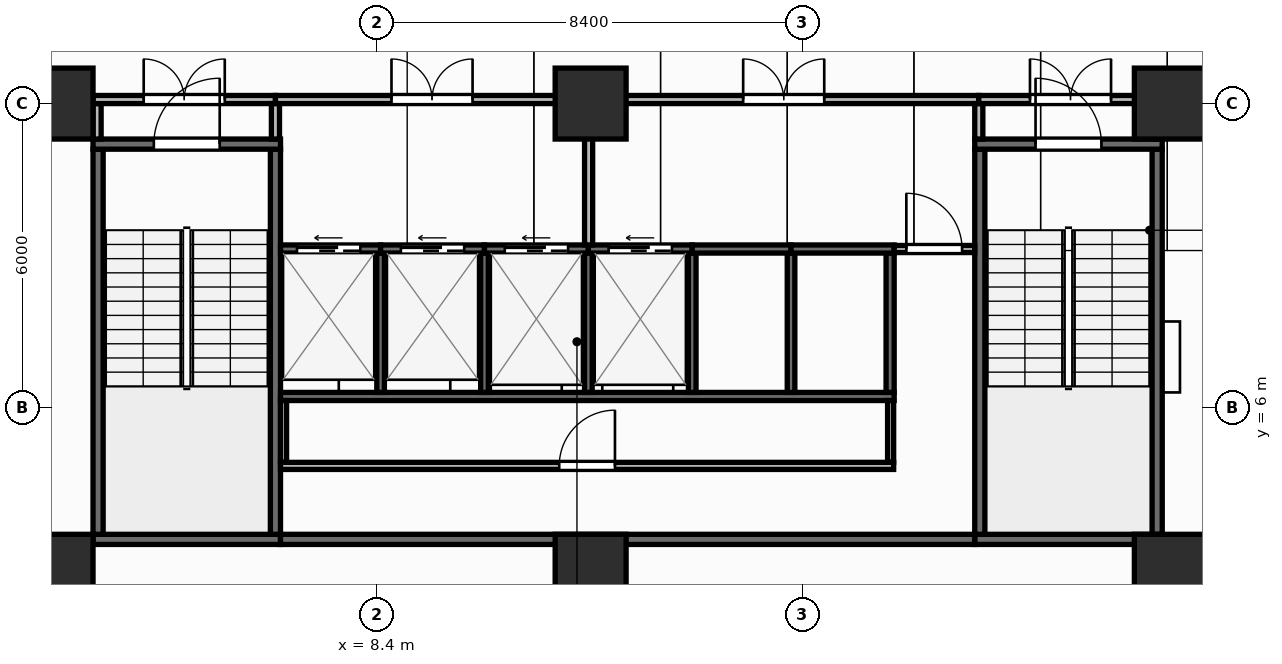
"""IFC4 building model, lengths in metres.
Left out: names, types, materials, properties, quantities, classifications, styles, units other than length and angle.
Written with IfcOpenShell. Run it as: python <this file> out.ifc"""

import sys

from ifc_helpers import new_model, si_unit, direction, frame, frame_2d, origin, origin_2d, place, context, subcontext, project, spatial, rectangle, extrude, element, fill, save


model = new_model("IFC4")
c1 = context("Model", 3, precision=1e-05, world=origin(), true_north=direction((0.0, 1.0)))
c2 = subcontext(c1, "Body", "Model", "MODEL_VIEW")
j1 = project(units=[si_unit("LENGTHUNIT", "METRE"), si_unit("PLANEANGLEUNIT", "RADIAN")], contexts=[c1])
p1 = place(None, origin())
s1 = spatial("IfcSite", under=j1, at=p1, CompositionType="ELEMENT")
p2 = place(p1, origin())
s2 = spatial("IfcBuilding", under=s1, at=p2, CompositionType="ELEMENT")
p3 = place(p2, frame((0.0, 0.0, -9.0)))
s3 = spatial("IfcBuildingStorey", under=s2, at=p3, CompositionType="ELEMENT", Elevation=-9.0)
for number, where, z_axis, x_axis in (
    (1, (2.1, 2.8, 0.0), (0.0, 0.0, 1.0), (1.0, 0.0, 0.0)),
    (2, (12.62, 2.8, 0.0), (0.0, 0.0, 1.0), (1.0, 0.0, 0.0)),
    (3, (24.05, 2.8, 0.0), (0.0, 0.0, 1.0), (1.0, 0.0, 0.0)),
    (4, (2.1, 12.0, 0.0), (0.0, 0.0, 1.0), (1.0, 0.0, 0.0)),
    (5, (12.62, 12.0, 0.0), (0.0, 0.0, 1.0), (1.0, 0.0, 0.0)),
    (6, (24.05, 12.0, 0.0), (0.0, 0.0, 1.0), (1.0, 0.0, 0.0)),
):
    element("IfcColumn", number, at=place(p3, frame(where, z_axis=z_axis, x_axis=x_axis)), inside=s3, PredefinedType="COLUMN", context=c2, shape_type="SweptSolid", body=[
        extrude(rectangle(XDim=1.4, YDim=1.4, at=origin_2d()), origin(), (0.0, 0.0, 1.0), 4.5),
    ])
p4 = place(p3, frame((2.8, 3.4, 0.0), z_axis=(0.0, 0.0, 1.0), x_axis=(1.0, 0.0, 0.0)))
e7 = element("IfcWall", 7, at=p4, inside=s3, PredefinedType="SHEAR", context=c2, shape_type="SweptSolid", body=[
    extrude(rectangle(XDim=3.7, YDim=0.2, at=frame_2d((1.85, 0.0))), origin(), (0.0, 0.0, 1.0), 4.24),
])
for number, where, z_axis, x_axis in (
    (8, (2.9, 3.5, 0.0), (0.0, 0.0, 1.0), (0.0, 1.0, 0.0)),
    (9, (6.4, 3.5, 0.0), (0.0, 0.0, 1.0), (0.0, 1.0, 0.0)),
):
    element("IfcWall", number, at=place(p3, frame(where, z_axis=z_axis, x_axis=x_axis)), inside=s3, PredefinedType="SHEAR", context=c2, shape_type="SweptSolid", body=[
        extrude(rectangle(XDim=7.6, YDim=0.2, at=frame_2d((3.8, 0.0))), origin(), (0.0, 0.0, 1.0), 4.24),
    ])
p5 = place(p3, frame((2.8, 11.2, 0.0), z_axis=(0.0, 0.0, 1.0), x_axis=(1.0, 0.0, 0.0)))
e10 = element("IfcWall", 10, at=p5, inside=s3, PredefinedType="SHEAR", context=c2, shape_type="SweptSolid", body=[
    extrude(rectangle(XDim=3.7, YDim=0.2, at=frame_2d((1.85, 0.0))), origin(), (0.0, 0.0, 1.0), 4.24),
])
p6 = place(p5, frame((1.2, 0.0, 0.0)))
e11 = element("IfcOpeningElement", 11, at=p6, cuts=e10, PredefinedType="OPENING", context=c2, shape_type="SweptSolid", body=[
    extrude(rectangle(XDim=1.3, YDim=2.15, at=frame_2d((0.65, 1.075))), frame((0.0, 0.11, 0.0), z_axis=(0.0, -1.0, 0.0), x_axis=(1.0, 0.0, 0.0)), (0.0, 0.0, 1.0), 0.22),
])
p7 = place(p3, frame((20.2, 3.4, 0.0), z_axis=(0.0, 0.0, 1.0), x_axis=(1.0, 0.0, 0.0)))
e12 = element("IfcWall", 12, at=p7, inside=s3, PredefinedType="SHEAR", context=c2, shape_type="SweptSolid", body=[
    extrude(rectangle(XDim=3.7, YDim=0.2, at=frame_2d((1.85, 0.0))), origin(), (0.0, 0.0, 1.0), 4.24),
])
for number, where, z_axis, x_axis in (
    (13, (20.3, 3.5, 0.0), (0.0, 0.0, 1.0), (0.0, 1.0, 0.0)),
    (14, (23.8, 3.5, 0.0), (0.0, 0.0, 1.0), (0.0, 1.0, 0.0)),
):
    element("IfcWall", number, at=place(p3, frame(where, z_axis=z_axis, x_axis=x_axis)), inside=s3, PredefinedType="SHEAR", context=c2, shape_type="SweptSolid", body=[
        extrude(rectangle(XDim=7.6, YDim=0.2, at=frame_2d((3.8, 0.0))), origin(), (0.0, 0.0, 1.0), 4.24),
    ])
p8 = place(p3, frame((20.2, 11.2, 0.0), z_axis=(0.0, 0.0, 1.0), x_axis=(1.0, 0.0, 0.0)))
e15 = element("IfcWall", 15, at=p8, inside=s3, PredefinedType="SHEAR", context=c2, shape_type="SweptSolid", body=[
    extrude(rectangle(XDim=3.7, YDim=0.2, at=frame_2d((1.85, 0.0))), origin(), (0.0, 0.0, 1.0), 4.24),
])
p9 = place(p8, frame((1.2, 0.0, 0.0)))
e16 = element("IfcOpeningElement", 16, at=p9, cuts=e15, PredefinedType="OPENING", context=c2, shape_type="SweptSolid", body=[
    extrude(rectangle(XDim=1.3, YDim=2.15, at=frame_2d((0.65, 1.075))), frame((0.0, 0.11, 0.0), z_axis=(0.0, -1.0, 0.0), x_axis=(1.0, 0.0, 0.0)), (0.0, 0.0, 1.0), 0.22),
])
p10 = place(p3, frame((6.5, 3.4, 0.0), z_axis=(0.0, 0.0, 1.0), x_axis=(1.0, 0.0, 0.0)))
e17 = element("IfcWall", 17, at=p10, inside=s3, PredefinedType="SHEAR", context=c2, shape_type="SweptSolid", body=[
    extrude(rectangle(XDim=13.7, YDim=0.2, at=frame_2d((6.85, 0.0))), origin(), (0.0, 0.0, 1.0), 4.24),
])
p11 = place(p3, frame((6.5, 6.22, 0.0), z_axis=(0.0, 0.0, 1.0), x_axis=(1.0, 0.0, 0.0)))
e18 = element("IfcWall", 18, at=p11, inside=s3, PredefinedType="SHEAR", context=c2, shape_type="SweptSolid", body=[
    extrude(rectangle(XDim=12.11, YDim=0.16, at=frame_2d((6.055, 0.0))), origin(), (0.0, 0.0, 1.0), 4.24),
])
p12 = place(p3, frame((18.53, 6.3, 0.0), z_axis=(0.0, 0.0, 1.0), x_axis=(0.0, 1.0, 0.0)))
e19 = element("IfcWall", 19, at=p12, inside=s3, PredefinedType="SHEAR", context=c2, shape_type="SweptSolid", body=[
    extrude(rectangle(XDim=2.75, YDim=0.16, at=frame_2d((1.375, 0.0))), origin(), (0.0, 0.0, 1.0), 4.24),
])
for number, where, z_axis, x_axis in (
    (20, (8.475, 6.3, 0.0), (0.0, 0.0, 1.0), (0.0, 1.0, 0.0)),
    (21, (10.525, 6.3, 0.0), (0.0, 0.0, 1.0), (0.0, 1.0, 0.0)),
    (22, (12.575, 6.3, 0.0), (0.0, 0.0, 1.0), (0.0, 1.0, 0.0)),
    (23, (14.625, 6.3, 0.0), (0.0, 0.0, 1.0), (0.0, 1.0, 0.0)),
    (24, (16.575, 6.3, 0.0), (0.0, 0.0, 1.0), (0.0, 1.0, 0.0)),
):
    element("IfcWall", number, at=place(p3, frame(where, z_axis=z_axis, x_axis=x_axis)), inside=s3, PredefinedType="SHEAR", context=c2, shape_type="SweptSolid", body=[
        extrude(rectangle(XDim=2.75, YDim=0.15, at=frame_2d((1.375, 0.0))), origin(), (0.0, 0.0, 1.0), 4.24),
    ])
p13 = place(p3, frame((6.5, 9.13, 0.0), z_axis=(0.0, 0.0, 1.0), x_axis=(1.0, 0.0, 0.0)))
e25 = element("IfcWall", 25, at=p13, inside=s3, PredefinedType="SHEAR", context=c2, shape_type="SweptSolid", body=[
    extrude(rectangle(XDim=1.975, YDim=0.16, at=frame_2d((0.988, 0.0))), origin(), (0.0, 0.0, 1.0), 4.24),
])
p14 = place(p13, frame((0.325, 0.0, 0.0)))
e26 = element("IfcOpeningElement", 26, at=p14, cuts=e25, PredefinedType="OPENING", context=c2, shape_type="SweptSolid", body=[
    extrude(rectangle(XDim=1.25, YDim=2.15, at=frame_2d((0.625, 1.075))), frame((0.0, 0.09, 0.0), z_axis=(0.0, -1.0, 0.0), x_axis=(1.0, 0.0, 0.0)), (0.0, 0.0, 1.0), 0.18),
])
p15 = place(p3, frame((8.475, 9.13, 0.0), z_axis=(0.0, 0.0, 1.0), x_axis=(1.0, 0.0, 0.0)))
e27 = element("IfcWall", 27, at=p15, inside=s3, PredefinedType="SHEAR", context=c2, shape_type="SweptSolid", body=[
    extrude(rectangle(XDim=2.05, YDim=0.16, at=frame_2d((1.025, 0.0))), origin(), (0.0, 0.0, 1.0), 4.24),
])
p16 = place(p15, frame((0.4, 0.0, 0.0)))
e28 = element("IfcOpeningElement", 28, at=p16, cuts=e27, PredefinedType="OPENING", context=c2, shape_type="SweptSolid", body=[
    extrude(rectangle(XDim=1.25, YDim=2.15, at=frame_2d((0.625, 1.075))), frame((0.0, 0.09, 0.0), z_axis=(0.0, -1.0, 0.0), x_axis=(1.0, 0.0, 0.0)), (0.0, 0.0, 1.0), 0.18),
])
p17 = place(p3, frame((10.525, 9.13, 0.0), z_axis=(0.0, 0.0, 1.0), x_axis=(1.0, 0.0, 0.0)))
e29 = element("IfcWall", 29, at=p17, inside=s3, PredefinedType="SHEAR", context=c2, shape_type="SweptSolid", body=[
    extrude(rectangle(XDim=2.05, YDim=0.16, at=frame_2d((1.025, 0.0))), origin(), (0.0, 0.0, 1.0), 4.24),
])
p18 = place(p17, frame((0.4, 0.0, 0.0)))
e30 = element("IfcOpeningElement", 30, at=p18, cuts=e29, PredefinedType="OPENING", context=c2, shape_type="SweptSolid", body=[
    extrude(rectangle(XDim=1.25, YDim=2.15, at=frame_2d((0.625, 1.075))), frame((0.0, 0.09, 0.0), z_axis=(0.0, -1.0, 0.0), x_axis=(1.0, 0.0, 0.0)), (0.0, 0.0, 1.0), 0.18),
])
p19 = place(p3, frame((12.575, 9.13, 0.0), z_axis=(0.0, 0.0, 1.0), x_axis=(1.0, 0.0, 0.0)))
e31 = element("IfcWall", 31, at=p19, inside=s3, PredefinedType="SHEAR", context=c2, shape_type="SweptSolid", body=[
    extrude(rectangle(XDim=2.05, YDim=0.16, at=frame_2d((1.025, 0.0))), origin(), (0.0, 0.0, 1.0), 4.24),
])
p20 = place(p19, frame((0.4, 0.0, 0.0)))
e32 = element("IfcOpeningElement", 32, at=p20, cuts=e31, PredefinedType="OPENING", context=c2, shape_type="SweptSolid", body=[
    extrude(rectangle(XDim=1.25, YDim=2.15, at=frame_2d((0.625, 1.075))), frame((0.0, 0.09, 0.0), z_axis=(0.0, -1.0, 0.0), x_axis=(1.0, 0.0, 0.0)), (0.0, 0.0, 1.0), 0.18),
])
p21 = place(p3, frame((14.625, 9.13, 0.0), z_axis=(0.0, 0.0, 1.0), x_axis=(1.0, 0.0, 0.0)))
e33 = element("IfcWall", 33, at=p21, inside=s3, PredefinedType="SHEAR", context=c2, shape_type="SweptSolid", body=[
    extrude(rectangle(XDim=1.95, YDim=0.16, at=frame_2d((0.975, 0.0))), origin(), (0.0, 0.0, 1.0), 4.24),
])
p22 = place(p3, frame((16.575, 9.13, 0.0), z_axis=(0.0, 0.0, 1.0), x_axis=(1.0, 0.0, 0.0)))
e34 = element("IfcWall", 34, at=p22, inside=s3, PredefinedType="SHEAR", context=c2, shape_type="SweptSolid", body=[
    extrude(rectangle(XDim=2.035, YDim=0.16, at=frame_2d((1.018, 0.0))), origin(), (0.0, 0.0, 1.0), 4.24),
])
for number, where, z_axis, x_axis in (
    (35, (6.56, 4.92, 0.0), (0.0, 0.0, 1.0), (0.0, 1.0, 0.0)),
    (36, (18.54, 4.92, 0.0), (0.0, 0.0, 1.0), (0.0, 1.0, 0.0)),
):
    element("IfcWall", number, at=place(p3, frame(where, z_axis=z_axis, x_axis=x_axis)), inside=s3, PredefinedType="PARTITIONING", context=c2, shape_type="SweptSolid", body=[
        extrude(rectangle(XDim=1.22, YDim=0.12, at=frame_2d((0.61, 0.0))), origin(), (0.0, 0.0, 1.0), 4.24),
    ])
p23 = place(p3, frame((6.5, 4.85, 0.0), z_axis=(0.0, 0.0, 1.0), x_axis=(1.0, 0.0, 0.0)))
e37 = element("IfcWall", 37, at=p23, inside=s3, PredefinedType="PARTITIONING", context=c2, shape_type="SweptSolid", body=[
    extrude(rectangle(XDim=12.1, YDim=0.14, at=frame_2d((6.05, 0.0))), origin(), (0.0, 0.0, 1.0), 4.24),
])
p24 = place(p23, frame((5.5, 0.0, 0.0)))
e38 = element("IfcOpeningElement", 38, at=p24, cuts=e37, PredefinedType="OPENING", context=c2, shape_type="SweptSolid", body=[
    extrude(rectangle(XDim=1.1, YDim=2.1, at=frame_2d((0.55, 1.05))), frame((0.0, 0.08, 0.0), z_axis=(0.0, -1.0, 0.0), x_axis=(1.0, 0.0, 0.0)), (0.0, 0.0, 1.0), 0.16),
])
p25 = place(p3, frame((18.61, 9.13, 0.0), z_axis=(0.0, 0.0, 1.0), x_axis=(1.0, 0.0, 0.0)))
e39 = element("IfcWall", 39, at=p25, inside=s3, PredefinedType="PARTITIONING", context=c2, shape_type="SweptSolid", body=[
    extrude(rectangle(XDim=1.59, YDim=0.14, at=frame_2d((0.795, 0.0))), origin(), (0.0, 0.0, 1.0), 4.24),
])
p26 = place(p25, frame((0.24, 0.0, 0.0)))
e40 = element("IfcOpeningElement", 40, at=p26, cuts=e39, PredefinedType="OPENING", context=c2, shape_type="SweptSolid", body=[
    extrude(rectangle(XDim=1.1, YDim=2.1, at=frame_2d((0.55, 1.05))), frame((0.0, 0.08, 0.0), z_axis=(0.0, -1.0, 0.0), x_axis=(1.0, 0.0, 0.0)), (0.0, 0.0, 1.0), 0.16),
])
p27 = place(p3, frame((2.88, 11.3, 0.0), z_axis=(0.0, 0.0, 1.0), x_axis=(0.0, 1.0, 0.0)))
e41 = element("IfcWall", 41, at=p27, inside=s3, PredefinedType="PARTITIONING", context=c2, shape_type="SweptSolid", body=[
    extrude(rectangle(XDim=0.7, YDim=0.16, at=frame_2d((0.35, 0.0))), origin(), (0.0, 0.0, 1.0), 4.24),
])
p28 = place(p3, frame((2.8, 12.08, 0.0), z_axis=(0.0, 0.0, 1.0), x_axis=(1.0, 0.0, 0.0)))
e42 = element("IfcWall", 42, at=p28, inside=s3, PredefinedType="PARTITIONING", context=c2, shape_type="SweptSolid", body=[
    extrude(rectangle(XDim=3.6, YDim=0.16, at=frame_2d((1.8, 0.0))), origin(), (0.0, 0.0, 1.0), 3.305),
])
p29 = place(p28, frame((1.0, 0.0, 0.0)))
e43 = element("IfcOpeningElement", 43, at=p29, cuts=e42, PredefinedType="OPENING", context=c2, shape_type="SweptSolid", body=[
    extrude(rectangle(XDim=1.6, YDim=2.05, at=frame_2d((0.8, 1.025))), frame((0.0, 0.09, 0.0), z_axis=(0.0, -1.0, 0.0), x_axis=(1.0, 0.0, 0.0)), (0.0, 0.0, 1.0), 0.18),
])
p30 = place(p3, frame((6.4, 11.3, 0.0), z_axis=(0.0, 0.0, 1.0), x_axis=(0.0, 1.0, 0.0)))
e44 = element("IfcWall", 44, at=p30, inside=s3, PredefinedType="PARTITIONING", context=c2, shape_type="SweptSolid", body=[
    extrude(rectangle(XDim=0.7, YDim=0.16, at=frame_2d((0.35, 0.0))), origin(), (0.0, 0.0, 1.0), 4.24),
])
p31 = place(p3, frame((6.4, 12.08, 0.0), z_axis=(0.0, 0.0, 1.0), x_axis=(1.0, 0.0, 0.0)))
e45 = element("IfcWall", 45, at=p31, inside=s3, PredefinedType="PARTITIONING", context=c2, shape_type="SweptSolid", body=[
    extrude(rectangle(XDim=6.18, YDim=0.16, at=frame_2d((3.09, 0.0))), origin(), (0.0, 0.0, 1.0), 3.305),
])
p32 = place(p31, frame((2.29, 0.0, 0.0)))
e46 = element("IfcOpeningElement", 46, at=p32, cuts=e45, PredefinedType="OPENING", context=c2, shape_type="SweptSolid", body=[
    extrude(rectangle(XDim=1.6, YDim=2.05, at=frame_2d((0.8, 1.025))), frame((0.0, 0.09, 0.0), z_axis=(0.0, -1.0, 0.0), x_axis=(1.0, 0.0, 0.0)), (0.0, 0.0, 1.0), 0.18),
])
p33 = place(p3, frame((12.58, 9.21, 0.0), z_axis=(0.0, 0.0, 1.0), x_axis=(0.0, 1.0, 0.0)))
e47 = element("IfcWall", 47, at=p33, inside=s3, PredefinedType="PARTITIONING", context=c2, shape_type="SweptSolid", body=[
    extrude(rectangle(XDim=2.79, YDim=0.16, at=frame_2d((1.395, 0.0))), origin(), (0.0, 0.0, 1.0), 4.24),
])
p34 = place(p3, frame((12.58, 12.08, 0.0), z_axis=(0.0, 0.0, 1.0), x_axis=(1.0, 0.0, 0.0)))
e48 = element("IfcWall", 48, at=p34, inside=s3, PredefinedType="PARTITIONING", context=c2, shape_type="SweptSolid", body=[
    extrude(rectangle(XDim=7.7, YDim=0.16, at=frame_2d((3.85, 0.0))), origin(), (0.0, 0.0, 1.0), 3.305),
])
p35 = place(p34, frame((3.05, 0.0, 0.0)))
e49 = element("IfcOpeningElement", 49, at=p35, cuts=e48, PredefinedType="OPENING", context=c2, shape_type="SweptSolid", body=[
    extrude(rectangle(XDim=1.6, YDim=2.05, at=frame_2d((0.8, 1.025))), frame((0.0, 0.09, 0.0), z_axis=(0.0, -1.0, 0.0), x_axis=(1.0, 0.0, 0.0)), (0.0, 0.0, 1.0), 0.18),
])
p36 = place(p3, frame((20.28, 11.3, 0.0), z_axis=(0.0, 0.0, 1.0), x_axis=(0.0, 1.0, 0.0)))
e50 = element("IfcWall", 50, at=p36, inside=s3, PredefinedType="PARTITIONING", context=c2, shape_type="SweptSolid", body=[
    extrude(rectangle(XDim=0.7, YDim=0.16, at=frame_2d((0.35, 0.0))), origin(), (0.0, 0.0, 1.0), 4.24),
])
p37 = place(p3, frame((20.28, 12.08, 0.0), z_axis=(0.0, 0.0, 1.0), x_axis=(1.0, 0.0, 0.0)))
e51 = element("IfcWall", 51, at=p37, inside=s3, PredefinedType="PARTITIONING", context=c2, shape_type="SweptSolid", body=[
    extrude(rectangle(XDim=3.62, YDim=0.16, at=frame_2d((1.81, 0.0))), origin(), (0.0, 0.0, 1.0), 3.305),
])
p38 = place(p37, frame((1.01, 0.0, 0.0)))
e52 = element("IfcOpeningElement", 52, at=p38, cuts=e51, PredefinedType="OPENING", context=c2, shape_type="SweptSolid", body=[
    extrude(rectangle(XDim=1.6, YDim=2.05, at=frame_2d((0.8, 1.025))), frame((0.0, 0.09, 0.0), z_axis=(0.0, -1.0, 0.0), x_axis=(1.0, 0.0, 0.0)), (0.0, 0.0, 1.0), 0.18),
])
p39 = place(p3, frame((23.82, 11.3, 0.0), z_axis=(0.0, 0.0, 1.0), x_axis=(0.0, 1.0, 0.0)))
e53 = element("IfcWall", 53, at=p39, inside=s3, PredefinedType="PARTITIONING", context=c2, shape_type="SweptSolid", body=[
    extrude(rectangle(XDim=0.7, YDim=0.16, at=frame_2d((0.35, 0.0))), origin(), (0.0, 0.0, 1.0), 4.24),
])
p40 = place(p3, frame((24.02, 12.08, 0.0), z_axis=(0.0, 0.0, 1.0), x_axis=(1.0, 0.0, 0.0)))
e54 = element("IfcWall", 54, at=p40, inside=s3, PredefinedType="PARTITIONING", context=c2, shape_type="SweptSolid", body=[
    extrude(rectangle(XDim=1.65, YDim=0.16, at=frame_2d((0.825, 0.0))), origin(), (0.0, 0.0, 1.0), 3.305),
])
p41 = place(p6, origin())
e55 = element("IfcDoor", 55, at=p41, inside=s3, OperationType="SINGLE_SWING_RIGHT", PredefinedType="DOOR", context=c2, shape_type="SweptSolid", body=[
    extrude(rectangle(XDim=1.3, YDim=2.15, at=frame_2d((0.65, 1.075))), frame((0.0, 0.025, 0.0), z_axis=(0.0, -1.0, 0.0), x_axis=(1.0, 0.0, 0.0)), (0.0, 0.0, 1.0), 0.05),
])
fill(e11, e55)
p42 = place(p9, origin())
e56 = element("IfcDoor", 56, at=p42, inside=s3, OperationType="SINGLE_SWING_LEFT", PredefinedType="DOOR", context=c2, shape_type="SweptSolid", body=[
    extrude(rectangle(XDim=1.3, YDim=2.15, at=frame_2d((0.65, 1.075))), frame((0.0, 0.025, 0.0), z_axis=(0.0, -1.0, 0.0), x_axis=(1.0, 0.0, 0.0)), (0.0, 0.0, 1.0), 0.05),
])
fill(e16, e56)
p43 = place(p14, origin())
e57 = element("IfcDoor", 57, at=p43, inside=s3, OperationType="SLIDING_TO_LEFT", PredefinedType="DOOR", context=c2, shape_type="SweptSolid", body=[
    extrude(rectangle(XDim=1.25, YDim=2.15, at=frame_2d((0.625, 1.075))), frame((0.0, 0.025, 0.0), z_axis=(0.0, -1.0, 0.0), x_axis=(1.0, 0.0, 0.0)), (0.0, 0.0, 1.0), 0.05),
])
fill(e26, e57)
p44 = place(p16, origin())
e58 = element("IfcDoor", 58, at=p44, inside=s3, OperationType="SLIDING_TO_LEFT", PredefinedType="DOOR", context=c2, shape_type="SweptSolid", body=[
    extrude(rectangle(XDim=1.25, YDim=2.15, at=frame_2d((0.625, 1.075))), frame((0.0, 0.025, 0.0), z_axis=(0.0, -1.0, 0.0), x_axis=(1.0, 0.0, 0.0)), (0.0, 0.0, 1.0), 0.05),
])
fill(e28, e58)
p45 = place(p18, origin())
e59 = element("IfcDoor", 59, at=p45, inside=s3, OperationType="SLIDING_TO_LEFT", PredefinedType="DOOR", context=c2, shape_type="SweptSolid", body=[
    extrude(rectangle(XDim=1.25, YDim=2.15, at=frame_2d((0.625, 1.075))), frame((0.0, 0.025, 0.0), z_axis=(0.0, -1.0, 0.0), x_axis=(1.0, 0.0, 0.0)), (0.0, 0.0, 1.0), 0.05),
])
fill(e30, e59)
p46 = place(p20, origin())
e60 = element("IfcDoor", 60, at=p46, inside=s3, OperationType="SLIDING_TO_LEFT", PredefinedType="DOOR", context=c2, shape_type="SweptSolid", body=[
    extrude(rectangle(XDim=1.25, YDim=2.15, at=frame_2d((0.625, 1.075))), frame((0.0, 0.025, 0.0), z_axis=(0.0, -1.0, 0.0), x_axis=(1.0, 0.0, 0.0)), (0.0, 0.0, 1.0), 0.05),
])
fill(e32, e60)
p47 = place(p24, origin())
e61 = element("IfcDoor", 61, at=p47, inside=s3, OperationType="SINGLE_SWING_RIGHT", PredefinedType="DOOR", context=c2, shape_type="SweptSolid", body=[
    extrude(rectangle(XDim=1.1, YDim=2.1, at=frame_2d((0.55, 1.05))), frame((0.0, 0.025, 0.0), z_axis=(0.0, -1.0, 0.0), x_axis=(1.0, 0.0, 0.0)), (0.0, 0.0, 1.0), 0.05),
])
fill(e38, e61)
p48 = place(p26, origin())
e62 = element("IfcDoor", 62, at=p48, inside=s3, OperationType="SINGLE_SWING_LEFT", PredefinedType="DOOR", context=c2, shape_type="SweptSolid", body=[
    extrude(rectangle(XDim=1.1, YDim=2.1, at=frame_2d((0.55, 1.05))), frame((0.0, 0.025, 0.0), z_axis=(0.0, -1.0, 0.0), x_axis=(1.0, 0.0, 0.0)), (0.0, 0.0, 1.0), 0.05),
])
fill(e40, e62)
p49 = place(p29, origin())
e63 = element("IfcDoor", 63, at=p49, inside=s3, OperationType="DOUBLE_DOOR_SINGLE_SWING", PredefinedType="DOOR", context=c2, shape_type="SweptSolid", body=[
    extrude(rectangle(XDim=1.6, YDim=2.05, at=frame_2d((0.8, 1.025))), frame((0.0, 0.025, 0.0), z_axis=(0.0, -1.0, 0.0), x_axis=(1.0, 0.0, 0.0)), (0.0, 0.0, 1.0), 0.05),
])
fill(e43, e63)
p50 = place(p32, origin())
e64 = element("IfcDoor", 64, at=p50, inside=s3, OperationType="DOUBLE_DOOR_SINGLE_SWING", PredefinedType="DOOR", context=c2, shape_type="SweptSolid", body=[
    extrude(rectangle(XDim=1.6, YDim=2.05, at=frame_2d((0.8, 1.025))), frame((0.0, 0.025, 0.0), z_axis=(0.0, -1.0, 0.0), x_axis=(1.0, 0.0, 0.0)), (0.0, 0.0, 1.0), 0.05),
])
fill(e46, e64)
p51 = place(p35, origin())
e65 = element("IfcDoor", 65, at=p51, inside=s3, OperationType="DOUBLE_DOOR_SINGLE_SWING", PredefinedType="DOOR", context=c2, shape_type="SweptSolid", body=[
    extrude(rectangle(XDim=1.6, YDim=2.05, at=frame_2d((0.8, 1.025))), frame((0.0, 0.025, 0.0), z_axis=(0.0, -1.0, 0.0), x_axis=(1.0, 0.0, 0.0)), (0.0, 0.0, 1.0), 0.05),
])
fill(e49, e65)
p52 = place(p38, origin())
e66 = element("IfcDoor", 66, at=p52, inside=s3, OperationType="DOUBLE_DOOR_SINGLE_SWING", PredefinedType="DOOR", context=c2, shape_type="SweptSolid", body=[
    extrude(rectangle(XDim=1.6, YDim=2.05, at=frame_2d((0.8, 1.025))), frame((0.0, 0.025, 0.0), z_axis=(0.0, -1.0, 0.0), x_axis=(1.0, 0.0, 0.0)), (0.0, 0.0, 1.0), 0.05),
])
fill(e52, e66)
save(model, sys.argv[1])
